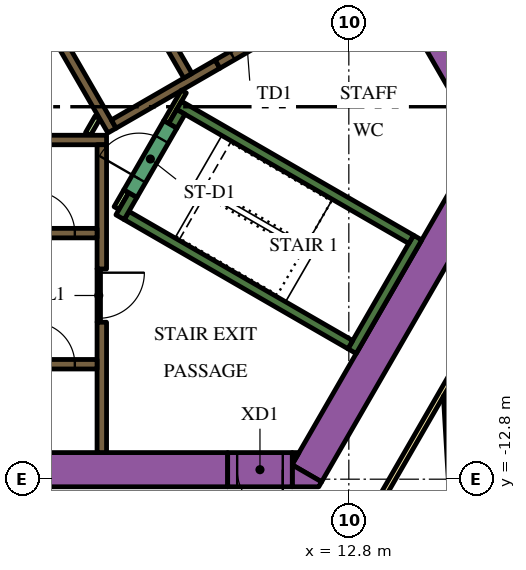
"""IFC4 building model, lengths in metres.
Left out: names, types, materials, properties, quantities, classifications, styles, units other than length and angle.
Written with IfcOpenShell. Run it as: python <this file> out.ifc"""

import sys

from ifc_helpers import new_model, si_unit, direction, frame, frame_2d, origin, place, context, subcontext, project, spatial, polyline, rectangle, outline, extrude, element, fill, save


model = new_model("IFC4")
c1 = context("Model", 3, precision=1e-05, world=origin(), true_north=direction((0.0, 1.0)))
c2 = subcontext(c1, "Body", "Model", "MODEL_VIEW")
j1 = project(units=[si_unit("LENGTHUNIT", "METRE"), si_unit("PLANEANGLEUNIT", "RADIAN")], contexts=[c1])
p1 = place(None, origin())
s1 = spatial("IfcSite", under=j1, at=p1, CompositionType="ELEMENT")
p2 = place(p1, origin())
s2 = spatial("IfcBuilding", under=s1, at=p2, CompositionType="ELEMENT")
p3 = place(p2, frame((0.0, 0.0, 83.7)))
s3 = spatial("IfcBuildingStorey", under=s2, at=p3, CompositionType="ELEMENT", Elevation=83.7)
p4 = place(p3, frame((6.776, 13.364, 0.0), z_axis=(0.0, 0.0, 1.0), x_axis=(0.500004177138, -0.8660229921, 0.0)))
e1 = element("IfcWall", 1, at=p4, inside=s3, PredefinedType="SOLIDWALL", context=c2, shape_type="SweptSolid", body=[
    extrude(rectangle(XDim=20.204, YDim=0.9, at=frame_2d((10.102, 0.0))), origin(), (0.0, 0.0, 1.0), 3.9),
])
p5 = place(p3, frame((11.695, -12.644, 0.0), z_axis=(0.0, 0.0, 1.0), x_axis=(0.500010229568, 0.86601949766, 0.0)))
e2 = element("IfcWall", 2, at=p5, inside=s3, PredefinedType="SOLIDWALL", context=c2, shape_type="SweptSolid", body=[
    extrude(rectangle(XDim=9.326, YDim=0.9, at=frame_2d((4.663, 0.0))), origin(), (0.0, 0.0, 1.0), 3.9),
])
p6 = place(p3, origin())
e3 = element("IfcWall", 3, at=p6, inside=s3, PredefinedType="SOLIDWALL", context=c2, shape_type="SweptSolid", body=[
    extrude(outline(polyline([(12.009, -13.0), (11.312, -13.0), (11.312, -12.425), (12.083, -12.871), (12.009, -13.0)])), origin(), (0.0, 0.0, 1.0), 3.9),
])
e4 = element("IfcWall", 4, at=p6, inside=s3, PredefinedType="SOLIDWALL", context=c2, shape_type="SweptSolid", body=[
    extrude(outline(polyline([(11.489, -12.1), (11.312, -12.407), (11.312, -12.1), (11.489, -12.1)])), origin(), (0.0, 0.0, 1.0), 3.9),
])
p7 = place(p3, frame((-12.019, -12.55, 0.0), z_axis=(0.0, 0.0, 1.0), x_axis=(1.0, 0.0, 0.0)))
e5 = element("IfcWall", 5, at=p7, inside=s3, PredefinedType="SOLIDWALL", context=c2, shape_type="SweptSolid", body=[
    extrude(rectangle(XDim=21.63, YDim=0.9, at=frame_2d((10.815, 0.0))), origin(), (0.0, 0.0, 1.0), 3.9),
])
p8 = place(p3, frame((12.885, -9.431, 0.0), z_axis=(0.0, 0.0, 1.0), x_axis=(0.500020560727, 0.866013532718, 0.0)))
e6 = element("IfcWall", 6, at=p8, inside=s3, PredefinedType="SOLIDWALL", context=c2, shape_type="SweptSolid", body=[
    extrude(rectangle(XDim=3.45, YDim=0.25, at=frame_2d((1.725, 0.0))), origin(), (0.0, 0.0, 1.0), 3.9),
])
p9 = place(p3, frame((12.84, -9.261, 0.0), z_axis=(0.0, 0.0, 1.0), x_axis=(-0.866013990052, 0.500019768644, 0.0)))
e7 = element("IfcWall", 7, at=p9, inside=s3, PredefinedType="SOLIDWALL", context=c2, shape_type="SweptSolid", body=[
    extrude(rectangle(XDim=6.8, YDim=0.25, at=frame_2d((3.4, 0.0))), origin(), (0.0, 0.0, 1.0), 3.9),
])
p10 = place(p3, frame((6.78, -5.906, 0.0), z_axis=(0.0, 0.0, 1.0), x_axis=(0.500223362819, 0.865896406789, 0.0)))
e8 = element("IfcWall", 8, at=p10, inside=s3, PredefinedType="SOLIDWALL", context=c2, shape_type="SweptSolid", body=[
    extrude(rectangle(XDim=0.675, YDim=0.25, at=frame_2d((0.337, 0.0))), origin(), (0.0, 0.0, 1.0), 3.9),
])
p11 = place(p3, frame((8.334, -2.964, 0.0), z_axis=(0.0, 0.0, 1.0), x_axis=(0.866016039709, -0.500016218704, 0.0)))
e9 = element("IfcWall", 9, at=p11, inside=s3, PredefinedType="SOLIDWALL", context=c2, shape_type="SweptSolid", body=[
    extrude(rectangle(XDim=7.05, YDim=0.25, at=frame_2d((3.525, 0.0))), origin(), (0.0, 0.0, 1.0), 3.9),
])
p12 = place(p3, frame((8.168, -3.503, 0.0), z_axis=(0.0, 0.0, 1.0), x_axis=(0.49972245349, 0.866185586049, 0.0)))
e10 = element("IfcWall", 10, at=p12, inside=s3, PredefinedType="SOLIDWALL", context=c2, shape_type="SweptSolid", body=[
    extrude(rectangle(XDim=0.425, YDim=0.25, at=frame_2d((0.212, 0.0))), origin(), (0.0, 0.0, 1.0), 3.9),
])
p13 = place(p3, frame((-5.845, -3.875, 0.0), z_axis=(0.0, 0.0, 1.0), x_axis=(1.0, 0.0, 0.0)))
e11 = element("IfcWall", 11, at=p13, inside=s3, PredefinedType="SOLIDWALL", context=c2, shape_type="SweptSolid", body=[
    extrude(rectangle(XDim=12.27, YDim=0.25, at=frame_2d((6.135, 0.0))), origin(), (0.0, 0.0, 1.0), 3.9),
])
p14 = place(p3, frame((6.3, -8.67, 0.0), z_axis=(0.0, 0.0, 1.0), x_axis=(0.0, -1.0, 0.0)))
e12 = element("IfcWall", 12, at=p14, inside=s3, PredefinedType="SOLIDWALL", context=c2, shape_type="SweptSolid", body=[
    extrude(rectangle(XDim=3.43, YDim=0.25, at=frame_2d((1.715, 0.0))), origin(), (0.0, 0.0, 1.0), 3.9),
])
p15 = place(p3, frame((6.3, -7.268, 0.0), z_axis=(0.0, 0.0, 1.0), x_axis=(0.0, 1.0, 0.0)))
e13 = element("IfcWall", 13, at=p15, inside=s3, PredefinedType="SOLIDWALL", context=c2, shape_type="SweptSolid", body=[
    extrude(rectangle(XDim=3.268, YDim=0.25, at=frame_2d((1.634, 0.0))), origin(), (0.0, 0.0, 1.0), 3.9),
])
e14 = element("IfcWall", 14, at=p6, inside=s3, PredefinedType="SOLIDWALL", context=c2, shape_type="SweptSolid", body=[
    extrude(outline(polyline([(0.335, 6.925), (0.335, 7.075), (0.335, 7.075), (0.335, 7.075), (0.245, 7.075), (0.079, 7.363), (0.035, 7.439), (0.252, 7.564), (0.377, 7.348), (6.552, -3.348), (6.677, -3.564), (6.46, -3.689), (4.897, -0.981), (0.332, 6.925), (0.335, 6.925), (0.335, 6.925), (0.335, 6.925)])), origin(), (0.0, 0.0, 1.0), 3.9),
])
p16 = place(p3, frame((6.614, -3.456, 0.0), z_axis=(0.0, 0.0, 1.0), x_axis=(0.86602447079, 0.500001615989, 0.0)))
e15 = element("IfcWall", 15, at=p16, inside=s3, PredefinedType="SOLIDWALL", context=c2, shape_type="SweptSolid", body=[
    extrude(rectangle(XDim=3.154, YDim=0.25, at=frame_2d((1.577, 0.0))), origin(), (0.0, 0.0, 1.0), 3.9),
])
p17 = place(p3, frame((6.945, -5.222, 0.0), z_axis=(0.0, 0.0, 1.0), x_axis=(-0.499818422106, -0.866130212453, 0.0)))
e16 = element("IfcWall", 16, at=p17, inside=s3, PredefinedType="PARTITIONING", context=c2, shape_type="SweptSolid", body=[
    extrude(rectangle(XDim=0.514, YDim=0.15, at=frame_2d((0.257, 0.0))), origin(), (0.0, 0.0, 1.0), 2.75),
])
p18 = place(p3, frame((5.936, -3.718, 0.0), z_axis=(0.0, 0.0, 1.0), x_axis=(0.499890179513, 0.866088799389, 0.0)))
e17 = element("IfcWall", 17, at=p18, inside=s3, PredefinedType="PARTITIONING", context=c2, shape_type="SweptSolid", body=[
    extrude(rectangle(XDim=0.504, YDim=0.15, at=frame_2d((0.252, 0.0))), origin(), (0.0, 0.0, 1.0), 2.75),
])
p19 = place(p3, frame((8.459, -2.599, 0.0), z_axis=(0.0, 0.0, 1.0), x_axis=(-0.500041054325, -0.866001699761, 0.0)))
e18 = element("IfcWall", 18, at=p19, inside=s3, PredefinedType="PARTITIONING", context=c2, shape_type="SweptSolid", body=[
    extrude(rectangle(XDim=0.929, YDim=0.15, at=frame_2d((0.464, 0.0))), origin(), (0.0, 0.0, 1.0), 3.9),
])
p20 = place(p3, frame((-6.175, -9.775, 0.0), z_axis=(0.0, 0.0, 1.0), x_axis=(1.0, 0.0, 0.0)))
e19 = element("IfcWall", 19, at=p20, inside=s3, PredefinedType="SOLIDWALL", context=c2, shape_type="SweptSolid", body=[
    extrude(rectangle(XDim=12.35, YDim=0.25, at=frame_2d((6.175, 0.0))), origin(), (0.0, 0.0, 1.0), 3.9),
])
p21 = place(p20, frame((0.585, 0.0, 0.0)))
e20 = element("IfcOpeningElement", 20, at=p21, cuts=e19, PredefinedType="OPENING", context=c2, shape_type="SweptSolid", body=[
    extrude(rectangle(XDim=1.1, YDim=2.1, at=frame_2d((0.55, 1.05))), frame((0.0, 0.135, 0.0), z_axis=(0.0, -1.0, 0.0), x_axis=(1.0, 0.0, 0.0)), (0.0, 0.0, 1.0), 0.27),
])
p22 = place(p20, frame((3.105, 0.0, 0.0)))
e21 = element("IfcOpeningElement", 21, at=p22, cuts=e19, PredefinedType="OPENING", context=c2, shape_type="SweptSolid", body=[
    extrude(rectangle(XDim=1.1, YDim=2.1, at=frame_2d((0.55, 1.05))), frame((0.0, 0.135, 0.0), z_axis=(0.0, -1.0, 0.0), x_axis=(1.0, 0.0, 0.0)), (0.0, 0.0, 1.0), 0.27),
])
p23 = place(p20, frame((5.625, 0.0, 0.0)))
e22 = element("IfcOpeningElement", 22, at=p23, cuts=e19, PredefinedType="OPENING", context=c2, shape_type="SweptSolid", body=[
    extrude(rectangle(XDim=1.1, YDim=2.1, at=frame_2d((0.55, 1.05))), frame((0.0, 0.135, 0.0), z_axis=(0.0, -1.0, 0.0), x_axis=(1.0, 0.0, 0.0)), (0.0, 0.0, 1.0), 0.27),
])
p24 = place(p20, frame((8.145, 0.0, 0.0)))
e23 = element("IfcOpeningElement", 23, at=p24, cuts=e19, PredefinedType="OPENING", context=c2, shape_type="SweptSolid", body=[
    extrude(rectangle(XDim=1.1, YDim=2.1, at=frame_2d((0.55, 1.05))), frame((0.0, 0.135, 0.0), z_axis=(0.0, -1.0, 0.0), x_axis=(1.0, 0.0, 0.0)), (0.0, 0.0, 1.0), 0.27),
])
p25 = place(p20, frame((10.665, 0.0, 0.0)))
e24 = element("IfcOpeningElement", 24, at=p25, cuts=e19, PredefinedType="OPENING", context=c2, shape_type="SweptSolid", body=[
    extrude(rectangle(XDim=1.1, YDim=2.1, at=frame_2d((0.55, 1.05))), frame((0.0, 0.135, 0.0), z_axis=(0.0, -1.0, 0.0), x_axis=(1.0, 0.0, 0.0)), (0.0, 0.0, 1.0), 0.27),
])
p26 = place(p3, frame((-6.175, -6.325, 0.0), z_axis=(0.0, 0.0, 1.0), x_axis=(1.0, 0.0, 0.0)))
e25 = element("IfcWall", 25, at=p26, inside=s3, PredefinedType="SOLIDWALL", context=c2, shape_type="SweptSolid", body=[
    extrude(rectangle(XDim=12.35, YDim=0.25, at=frame_2d((6.175, 0.0))), origin(), (0.0, 0.0, 1.0), 3.9),
])
p27 = place(p26, frame((3.205, 0.0, 0.0)))
e26 = element("IfcOpeningElement", 26, at=p27, cuts=e25, PredefinedType="OPENING", context=c2, shape_type="SweptSolid", body=[
    extrude(rectangle(XDim=0.9, YDim=2.1, at=frame_2d((0.45, 1.05))), frame((0.0, 0.135, 0.0), z_axis=(0.0, -1.0, 0.0), x_axis=(1.0, 0.0, 0.0)), (0.0, 0.0, 1.0), 0.27),
])
p28 = place(p26, frame((8.145, 0.0, 0.0)))
e27 = element("IfcOpeningElement", 27, at=p28, cuts=e25, PredefinedType="OPENING", context=c2, shape_type="SweptSolid", body=[
    extrude(rectangle(XDim=1.1, YDim=2.1, at=frame_2d((0.55, 1.05))), frame((0.0, 0.135, 0.0), z_axis=(0.0, -1.0, 0.0), x_axis=(1.0, 0.0, 0.0)), (0.0, 0.0, 1.0), 0.27),
])
p29 = place(p26, frame((10.665, 0.0, 0.0)))
e28 = element("IfcOpeningElement", 28, at=p29, cuts=e25, PredefinedType="OPENING", context=c2, shape_type="SweptSolid", body=[
    extrude(rectangle(XDim=1.1, YDim=2.1, at=frame_2d((0.55, 1.05))), frame((0.0, 0.135, 0.0), z_axis=(0.0, -1.0, 0.0), x_axis=(1.0, 0.0, 0.0)), (0.0, 0.0, 1.0), 0.27),
])
p30 = place(p3, frame((8.565, -2.185, 0.0), z_axis=(0.0, 0.0, 1.0), x_axis=(-0.499997954832, 0.866026584559, 0.0)))
e29 = element("IfcWall", 29, at=p30, inside=s3, PredefinedType="SOLIDWALL", context=c2, shape_type="SweptSolid", body=[
    extrude(rectangle(XDim=12.35, YDim=0.25, at=frame_2d((6.175, 0.0))), origin(), (0.0, 0.0, 1.0), 3.9),
])
p31 = place(p30, frame((5.725, 0.0, 0.0)))
e30 = element("IfcOpeningElement", 30, at=p31, cuts=e29, PredefinedType="OPENING", context=c2, shape_type="SweptSolid", body=[
    extrude(rectangle(XDim=0.9, YDim=2.1, at=frame_2d((0.45, 1.05))), frame((0.0, 0.135, 0.0), z_axis=(0.0, -1.0, 0.0), x_axis=(1.0, 0.0, 0.0)), (0.0, 0.0, 1.0), 0.27),
])
p32 = place(p3, frame((7.053, -5.284, 0.0), z_axis=(0.0, 0.0, 1.0), x_axis=(0.500078061341, 0.865980330357, 0.0)))
e31 = element("IfcWall", 31, at=p32, inside=s3, PredefinedType="SOLIDWALL", context=c2, shape_type="SweptSolid", body=[
    extrude(rectangle(XDim=2.1, YDim=0.4, at=frame_2d((1.05, 0.0))), origin(), (0.0, 0.0, 1.0), 3.9),
])
p33 = place(p32, frame((0.45, 0.0, 0.0)))
e32 = element("IfcOpeningElement", 32, at=p33, cuts=e31, PredefinedType="OPENING", context=c2, shape_type="SweptSolid", body=[
    extrude(rectangle(XDim=1.2, YDim=2.1, at=frame_2d((0.6, 1.05))), frame((0.0, 0.21, 0.0), z_axis=(0.0, -1.0, 0.0), x_axis=(1.0, 0.0, 0.0)), (0.0, 0.0, 1.0), 0.42),
])
p34 = place(p3, frame((9.346, -1.879, 0.0), z_axis=(0.0, 0.0, 1.0), x_axis=(0.866047807691, 0.499961193289, 0.0)))
e33 = element("IfcWall", 33, at=p34, inside=s3, PredefinedType="SOLIDWALL", context=c2, shape_type="SweptSolid", body=[
    extrude(rectangle(XDim=1.8, YDim=0.25, at=frame_2d((0.9, 0.0))), origin(), (0.0, 0.0, 1.0), 3.9),
])
p35 = place(p34, frame((0.45, 0.0, 0.0)))
e34 = element("IfcOpeningElement", 34, at=p35, cuts=e33, PredefinedType="OPENING", context=c2, shape_type="SweptSolid", body=[
    extrude(rectangle(XDim=0.9, YDim=2.1, at=frame_2d((0.45, 1.05))), frame((0.0, 0.135, 0.0), z_axis=(0.0, -1.0, 0.0), x_axis=(1.0, 0.0, 0.0)), (0.0, 0.0, 1.0), 0.27),
])
p36 = place(p3, frame((6.22, -7.266, 0.0), z_axis=(0.0, 0.0, 1.0), x_axis=(0.0, -1.0, 0.0)))
e35 = element("IfcWall", 35, at=p36, inside=s3, PredefinedType="PARTITIONING", context=c2, shape_type="SweptSolid", body=[
    extrude(rectangle(XDim=1.4, YDim=0.09, at=frame_2d((0.7, 0.0))), origin(), (0.0, 0.0, 1.0), 2.75),
])
p37 = place(p36, frame((0.1, 0.0, 0.0)))
e36 = element("IfcOpeningElement", 36, at=p37, cuts=e35, PredefinedType="OPENING", context=c2, shape_type="SweptSolid", body=[
    extrude(rectangle(XDim=1.2, YDim=2.1, at=frame_2d((0.6, 1.05))), frame((0.0, 0.055, 0.0), z_axis=(0.0, -1.0, 0.0), x_axis=(1.0, 0.0, 0.0)), (0.0, 0.0, 1.0), 0.11),
])
p38 = place(p3, frame((11.312, -12.55, 0.0), z_axis=(0.0, 0.0, 1.0), x_axis=(-1.0, 0.0, 0.0)))
e37 = element("IfcWall", 37, at=p38, inside=s3, PredefinedType="SOLIDWALL", context=c2, shape_type="SweptSolid", body=[
    extrude(rectangle(XDim=1.7, YDim=0.9, at=frame_2d((0.85, 0.0))), origin(), (0.0, 0.0, 1.0), 3.9),
])
p39 = place(p38, frame((0.25, 0.0, 0.0)))
e38 = element("IfcOpeningElement", 38, at=p39, cuts=e37, PredefinedType="OPENING", context=c2, shape_type="SweptSolid", body=[
    extrude(rectangle(XDim=1.2, YDim=2.1, at=frame_2d((0.6, 1.05))), frame((0.0, 0.46, 0.0), z_axis=(0.0, -1.0, 0.0), x_axis=(1.0, 0.0, 0.0)), (0.0, 0.0, 1.0), 0.92),
])
p40 = place(p3, frame((6.163, 18.475, 0.0), z_axis=(0.0, 0.0, 1.0), x_axis=(0.500001317485, -0.866024643133, 0.0)))
e39 = element("IfcWall", 39, at=p40, inside=s3, PredefinedType="PARTITIONING", context=c2, shape_type="SweptSolid", body=[
    extrude(rectangle(XDim=25.767, YDim=0.15, at=frame_2d((12.883, 0.0))), origin(), (0.0, 0.0, 1.0), 2.75),
])
p41 = place(p40, frame((24.241, 0.0, 0.0)))
e40 = element("IfcOpeningElement", 40, at=p41, cuts=e39, PredefinedType="OPENING", context=c2, shape_type="SweptSolid", body=[
    extrude(rectangle(XDim=1.0, YDim=2.1, at=frame_2d((0.5, 1.05))), frame((0.0, 0.085, 0.0), z_axis=(0.0, -1.0, 0.0), x_axis=(1.0, 0.0, 0.0)), (0.0, 0.0, 1.0), 0.17),
])
p42 = place(p40, frame((13.144, 0.0, 0.0)))
e41 = element("IfcOpeningElement", 41, at=p42, cuts=e39, PredefinedType="OPENING", context=c2, shape_type="SweptSolid", body=[
    extrude(rectangle(XDim=1.0, YDim=2.1, at=frame_2d((0.5, 1.05))), frame((0.0, 0.085, 0.0), z_axis=(0.0, -1.0, 0.0), x_axis=(1.0, 0.0, 0.0)), (0.0, 0.0, 1.0), 0.17),
])
p43 = place(p40, frame((10.874, 0.0, 0.0)))
e42 = element("IfcOpeningElement", 42, at=p43, cuts=e39, PredefinedType="OPENING", context=c2, shape_type="SweptSolid", body=[
    extrude(rectangle(XDim=0.9, YDim=2.1, at=frame_2d((0.45, 1.05))), frame((0.0, 0.085, 0.0), z_axis=(0.0, -1.0, 0.0), x_axis=(1.0, 0.0, 0.0)), (0.0, 0.0, 1.0), 0.17),
])
p44 = place(p40, frame((3.718, 0.0, 0.0)))
e43 = element("IfcOpeningElement", 43, at=p44, cuts=e39, PredefinedType="OPENING", context=c2, shape_type="SweptSolid", body=[
    extrude(rectangle(XDim=1.1, YDim=2.1, at=frame_2d((0.55, 1.05))), frame((0.0, 0.085, 0.0), z_axis=(0.0, -1.0, 0.0), x_axis=(1.0, 0.0, 0.0)), (0.0, 0.0, 1.0), 0.17),
])
p45 = place(p40, frame((2.411, 0.0, 0.0)))
e44 = element("IfcOpeningElement", 44, at=p45, cuts=e39, PredefinedType="OPENING", context=c2, shape_type="SweptSolid", body=[
    extrude(rectangle(XDim=1.0, YDim=2.1, at=frame_2d((0.5, 1.05))), frame((0.0, 0.085, 0.0), z_axis=(0.0, -1.0, 0.0), x_axis=(1.0, 0.0, 0.0)), (0.0, 0.0, 1.0), 0.17),
])
p46 = place(p3, frame((15.587, -9.952, 0.0), z_axis=(0.0, 0.0, 1.0), x_axis=(-0.500016618951, -0.866015808616, 0.0)))
e45 = element("IfcWall", 45, at=p46, inside=s3, PredefinedType="PARTITIONING", context=c2, shape_type="SweptSolid", body=[
    extrude(rectangle(XDim=5.268, YDim=0.15, at=frame_2d((2.634, 0.0))), origin(), (0.0, 0.0, 1.0), 2.75),
])
p47 = place(p3, frame((15.999, -21.467, 0.0), z_axis=(0.0, 0.0, 1.0), x_axis=(-0.058433825336, 0.998291284173, 0.0)))
e46 = element("IfcWall", 46, at=p47, inside=s3, PredefinedType="PARTITIONING", context=c2, shape_type="SweptSolid", body=[
    extrude(rectangle(XDim=10.875, YDim=0.15, at=frame_2d((5.438, 0.0))), origin(), (0.0, 0.0, 1.0), 2.75),
])
p48 = place(p25, origin())
e47 = element("IfcDoor", 47, at=p48, inside=s3, OperationType="DOUBLE_DOOR_SLIDING", PredefinedType="DOOR", context=c2, shape_type="SweptSolid", body=[
    extrude(rectangle(XDim=1.1, YDim=2.1, at=frame_2d((0.55, 1.05))), frame((0.0, 0.025, 0.0), z_axis=(0.0, -1.0, 0.0), x_axis=(1.0, 0.0, 0.0)), (0.0, 0.0, 1.0), 0.05),
])
fill(e24, e47)
p49 = place(p29, origin())
e48 = element("IfcDoor", 48, at=p49, inside=s3, OperationType="DOUBLE_DOOR_SLIDING", PredefinedType="DOOR", context=c2, shape_type="SweptSolid", body=[
    extrude(rectangle(XDim=1.1, YDim=2.1, at=frame_2d((0.55, 1.05))), frame((0.0, 0.025, 0.0), z_axis=(0.0, -1.0, 0.0), x_axis=(1.0, 0.0, 0.0)), (0.0, 0.0, 1.0), 0.05),
])
fill(e28, e48)
p50 = place(p33, origin())
e49 = element("IfcDoor", 49, at=p50, inside=s3, OperationType="SINGLE_SWING_LEFT", PredefinedType="DOOR", context=c2, shape_type="SweptSolid", body=[
    extrude(rectangle(XDim=1.2, YDim=2.1, at=frame_2d((0.6, 1.05))), frame((0.0, 0.025, 0.0), z_axis=(0.0, -1.0, 0.0), x_axis=(1.0, 0.0, 0.0)), (0.0, 0.0, 1.0), 0.05),
])
fill(e32, e49)
p51 = place(p35, origin())
e50 = element("IfcDoor", 50, at=p51, inside=s3, OperationType="SINGLE_SWING_LEFT", PredefinedType="DOOR", context=c2, shape_type="SweptSolid", body=[
    extrude(rectangle(XDim=0.9, YDim=2.1, at=frame_2d((0.45, 1.05))), frame((0.0, 0.025, 0.0), z_axis=(0.0, -1.0, 0.0), x_axis=(1.0, 0.0, 0.0)), (0.0, 0.0, 1.0), 0.05),
])
fill(e34, e50)
p52 = place(p37, origin())
e51 = element("IfcDoor", 51, at=p52, inside=s3, OperationType="SINGLE_SWING_LEFT", PredefinedType="DOOR", context=c2, shape_type="SweptSolid", body=[
    extrude(rectangle(XDim=1.2, YDim=2.1, at=frame_2d((0.6, 1.05))), frame((0.0, 0.025, 0.0), z_axis=(0.0, -1.0, 0.0), x_axis=(1.0, 0.0, 0.0)), (0.0, 0.0, 1.0), 0.05),
])
fill(e36, e51)
p53 = place(p39, origin())
e52 = element("IfcDoor", 52, at=p53, inside=s3, OperationType="SINGLE_SWING_LEFT", PredefinedType="DOOR", context=c2, shape_type="SweptSolid", body=[
    extrude(rectangle(XDim=1.2, YDim=2.1, at=frame_2d((0.6, 1.05))), frame((0.0, 0.025, 0.0), z_axis=(0.0, -1.0, 0.0), x_axis=(1.0, 0.0, 0.0)), (0.0, 0.0, 1.0), 0.05),
])
fill(e38, e52)
save(model, sys.argv[1])
